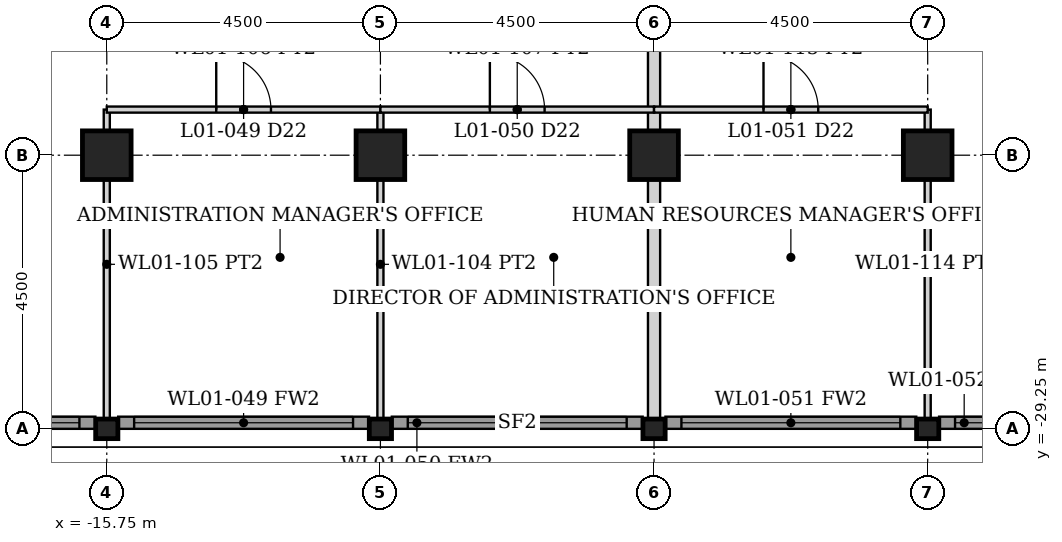
"""IFC4 building model, lengths in metres.
Left out: names, types, materials, properties, quantities, classifications, styles, units other than length and angle.
Written with IfcOpenShell. Run it as: python <this file> out.ifc"""

import sys

from ifc_helpers import new_model, si_unit, direction, frame, frame_2d, origin, origin_2d, place, context, subcontext, project, spatial, rectangle, hollow_rectangle, i_section, extrude, element, fill, save


model = new_model("IFC4")
c1 = context("Model", 3, precision=1e-05, world=origin(), true_north=direction((0.0, 1.0)))
c2 = subcontext(c1, "Body", "Model", "MODEL_VIEW")
j1 = project(units=[si_unit("LENGTHUNIT", "METRE"), si_unit("PLANEANGLEUNIT", "RADIAN")], contexts=[c1])
p1 = place(None, origin())
s1 = spatial("IfcSite", under=j1, at=p1, CompositionType="ELEMENT")
p2 = place(p1, origin())
s2 = spatial("IfcBuilding", under=s1, at=p2, CompositionType="ELEMENT")
p3 = place(p2, frame((0.0, 0.0, 6.0)))
s3 = spatial("IfcBuildingStorey", under=s2, at=p3, CompositionType="ELEMENT", Elevation=6.0)
for number, where, z_axis, x_axis in (
    (1, (-15.75, -24.75, 0.0), (0.0, 0.0, 1.0), (0.0, 1.0, 0.0)),
    (2, (-11.25, -24.75, 0.0), (0.0, 0.0, 1.0), (0.0, 1.0, 0.0)),
    (3, (-6.75, -24.75, 0.0), (0.0, 0.0, 1.0), (0.0, 1.0, 0.0)),
    (4, (-2.25, -24.75, 0.0), (0.0, 0.0, 1.0), (0.0, 1.0, 0.0)),
):
    element("IfcColumn", number, at=place(p3, frame(where, z_axis=z_axis, x_axis=x_axis)), inside=s3, PredefinedType="COLUMN", context=c2, shape_type="SweptSolid", body=[
        extrude(hollow_rectangle(XDim=0.8, YDim=0.8, WallThickness=0.08, at=origin_2d()), origin(), (0.0, 0.0, 1.0), 5.0),
    ])
for number, where, z_axis, x_axis in (
    (5, (-15.75, -29.25, 0.0), (0.0, 0.0, 1.0), (0.0, 1.0, 0.0)),
    (6, (-11.25, -29.25, 0.0), (0.0, 0.0, 1.0), (0.0, 1.0, 0.0)),
    (7, (-6.75, -29.25, 0.0), (0.0, 0.0, 1.0), (0.0, 1.0, 0.0)),
    (8, (-2.25, -29.25, 0.0), (0.0, 0.0, 1.0), (0.0, 1.0, 0.0)),
):
    element("IfcColumn", number, at=place(p3, frame(where, z_axis=z_axis, x_axis=x_axis)), inside=s3, PredefinedType="COLUMN", context=c2, shape_type="SweptSolid", body=[
        extrude(i_section(OverallWidth=0.322, OverallDepth=0.365, WebThickness=0.027, FlangeThickness=0.044, FilletRadius=0.015, at=origin_2d()), origin(), (0.0, 0.0, 1.0), 5.0),
    ])
p4 = place(p3, frame((-20.062, -29.15, 0.0), z_axis=(0.0, 0.0, 1.0), x_axis=(1.0, 0.0, 0.0)))
e9 = element("IfcWall", 9, at=p4, inside=s3, PredefinedType="SOLIDWALL", context=c2, shape_type="SweptSolid", body=[
    extrude(rectangle(XDim=4.125, YDim=0.2, at=frame_2d((2.062, 0.0))), origin(), (0.0, 0.0, 1.0), 4.133),
])
p5 = place(p4, frame((0.262, 0.0, 0.15)))
e10 = element("IfcOpeningElement", 10, at=p5, cuts=e9, PredefinedType="OPENING", context=c2, shape_type="SweptSolid", body=[
    extrude(rectangle(XDim=3.6, YDim=3.833, at=frame_2d((1.8, 1.917))), frame((0.0, 0.11, 0.0), z_axis=(0.0, -1.0, 0.0), x_axis=(1.0, 0.0, 0.0)), (0.0, 0.0, 1.0), 0.22),
])
p6 = place(p3, frame((-15.562, -29.15, 0.0), z_axis=(0.0, 0.0, 1.0), x_axis=(1.0, 0.0, 0.0)))
e11 = element("IfcWall", 11, at=p6, inside=s3, PredefinedType="SOLIDWALL", context=c2, shape_type="SweptSolid", body=[
    extrude(rectangle(XDim=4.125, YDim=0.2, at=frame_2d((2.062, 0.0))), origin(), (0.0, 0.0, 1.0), 4.133),
])
p7 = place(p6, frame((0.262, 0.0, 0.15)))
e12 = element("IfcOpeningElement", 12, at=p7, cuts=e11, PredefinedType="OPENING", context=c2, shape_type="SweptSolid", body=[
    extrude(rectangle(XDim=3.6, YDim=3.833, at=frame_2d((1.8, 1.917))), frame((0.0, 0.11, 0.0), z_axis=(0.0, -1.0, 0.0), x_axis=(1.0, 0.0, 0.0)), (0.0, 0.0, 1.0), 0.22),
])
p8 = place(p3, frame((-11.062, -29.15, 0.0), z_axis=(0.0, 0.0, 1.0), x_axis=(1.0, 0.0, 0.0)))
e13 = element("IfcWall", 13, at=p8, inside=s3, PredefinedType="SOLIDWALL", context=c2, shape_type="SweptSolid", body=[
    extrude(rectangle(XDim=4.125, YDim=0.2, at=frame_2d((2.062, 0.0))), origin(), (0.0, 0.0, 1.0), 4.133),
])
p9 = place(p8, frame((0.262, 0.0, 0.15)))
e14 = element("IfcOpeningElement", 14, at=p9, cuts=e13, PredefinedType="OPENING", context=c2, shape_type="SweptSolid", body=[
    extrude(rectangle(XDim=3.6, YDim=3.833, at=frame_2d((1.8, 1.917))), frame((0.0, 0.11, 0.0), z_axis=(0.0, -1.0, 0.0), x_axis=(1.0, 0.0, 0.0)), (0.0, 0.0, 1.0), 0.22),
])
p10 = place(p3, frame((-6.562, -29.15, 0.0), z_axis=(0.0, 0.0, 1.0), x_axis=(1.0, 0.0, 0.0)))
e15 = element("IfcWall", 15, at=p10, inside=s3, PredefinedType="SOLIDWALL", context=c2, shape_type="SweptSolid", body=[
    extrude(rectangle(XDim=4.125, YDim=0.2, at=frame_2d((2.062, 0.0))), origin(), (0.0, 0.0, 1.0), 4.133),
])
p11 = place(p10, frame((0.262, 0.0, 0.15)))
e16 = element("IfcOpeningElement", 16, at=p11, cuts=e15, PredefinedType="OPENING", context=c2, shape_type="SweptSolid", body=[
    extrude(rectangle(XDim=3.6, YDim=3.833, at=frame_2d((1.8, 1.917))), frame((0.0, 0.11, 0.0), z_axis=(0.0, -1.0, 0.0), x_axis=(1.0, 0.0, 0.0)), (0.0, 0.0, 1.0), 0.22),
])
p12 = place(p3, frame((-2.062, -29.15, 0.0), z_axis=(0.0, 0.0, 1.0), x_axis=(1.0, 0.0, 0.0)))
e17 = element("IfcWall", 17, at=p12, inside=s3, PredefinedType="SOLIDWALL", context=c2, shape_type="SweptSolid", body=[
    extrude(rectangle(XDim=4.125, YDim=0.2, at=frame_2d((2.062, 0.0))), origin(), (0.0, 0.0, 1.0), 4.133),
])
p13 = place(p12, frame((0.262, 0.0, 0.15)))
e18 = element("IfcOpeningElement", 18, at=p13, cuts=e17, PredefinedType="OPENING", context=c2, shape_type="SweptSolid", body=[
    extrude(rectangle(XDim=3.6, YDim=3.833, at=frame_2d((1.8, 1.917))), frame((0.0, 0.11, 0.0), z_axis=(0.0, -1.0, 0.0), x_axis=(1.0, 0.0, 0.0)), (0.0, 0.0, 1.0), 0.22),
])
p14 = place(p3, frame((-6.75, -29.089, 0.0), z_axis=(0.0, 0.0, 1.0), x_axis=(0.0, 1.0, 0.0)))
e19 = element("IfcWall", 19, at=p14, inside=s3, PredefinedType="PARTITIONING", context=c2, shape_type="SweptSolid", body=[
    extrude(rectangle(XDim=19.889, YDim=0.2, at=frame_2d((9.944, 0.0))), origin(), (0.0, 0.0, 1.0), 3.829),
])
for number, where, z_axis, x_axis in (
    (20, (-15.75, -29.089, 0.0), (0.0, 0.0, 1.0), (0.0, 1.0, 0.0)),
    (21, (-11.25, -29.089, 0.0), (0.0, 0.0, 1.0), (0.0, 1.0, 0.0)),
):
    element("IfcWall", number, at=place(p3, frame(where, z_axis=z_axis, x_axis=x_axis)), inside=s3, PredefinedType="PARTITIONING", context=c2, shape_type="SweptSolid", body=[
        extrude(rectangle(XDim=5.089, YDim=0.1, at=frame_2d((2.544, 0.0))), origin(), (0.0, 0.0, 1.0), 3.829),
    ])
p15 = place(p3, frame((-15.75, -24.0, 0.0), z_axis=(0.0, 0.0, 1.0), x_axis=(1.0, 0.0, 0.0)))
e22 = element("IfcWall", 22, at=p15, inside=s3, PredefinedType="PARTITIONING", context=c2, shape_type="SweptSolid", body=[
    extrude(rectangle(XDim=4.5, YDim=0.1, at=frame_2d((2.25, 0.0))), origin(), (0.0, 0.0, 1.0), 3.829),
])
p16 = place(p15, frame((1.8, 0.0, 0.0)))
e23 = element("IfcOpeningElement", 23, at=p16, cuts=e22, PredefinedType="OPENING", context=c2, shape_type="SweptSolid", body=[
    extrude(rectangle(XDim=0.9, YDim=2.1, at=frame_2d((0.45, 1.05))), frame((0.0, 0.06, 0.0), z_axis=(0.0, -1.0, 0.0), x_axis=(1.0, 0.0, 0.0)), (0.0, 0.0, 1.0), 0.12),
])
p17 = place(p3, frame((-11.25, -24.0, 0.0), z_axis=(0.0, 0.0, 1.0), x_axis=(1.0, 0.0, 0.0)))
e24 = element("IfcWall", 24, at=p17, inside=s3, PredefinedType="PARTITIONING", context=c2, shape_type="SweptSolid", body=[
    extrude(rectangle(XDim=4.5, YDim=0.1, at=frame_2d((2.25, 0.0))), origin(), (0.0, 0.0, 1.0), 3.829),
])
p18 = place(p17, frame((1.8, 0.0, 0.0)))
e25 = element("IfcOpeningElement", 25, at=p18, cuts=e24, PredefinedType="OPENING", context=c2, shape_type="SweptSolid", body=[
    extrude(rectangle(XDim=0.9, YDim=2.1, at=frame_2d((0.45, 1.05))), frame((0.0, 0.06, 0.0), z_axis=(0.0, -1.0, 0.0), x_axis=(1.0, 0.0, 0.0)), (0.0, 0.0, 1.0), 0.12),
])
p19 = place(p3, frame((-2.25, -29.089, 0.0), z_axis=(0.0, 0.0, 1.0), x_axis=(0.0, 1.0, 0.0)))
e26 = element("IfcWall", 26, at=p19, inside=s3, PredefinedType="PARTITIONING", context=c2, shape_type="SweptSolid", body=[
    extrude(rectangle(XDim=5.089, YDim=0.1, at=frame_2d((2.544, 0.0))), origin(), (0.0, 0.0, 1.0), 3.829),
])
p20 = place(p3, frame((-6.75, -24.0, 0.0), z_axis=(0.0, 0.0, 1.0), x_axis=(1.0, 0.0, 0.0)))
e27 = element("IfcWall", 27, at=p20, inside=s3, PredefinedType="PARTITIONING", context=c2, shape_type="SweptSolid", body=[
    extrude(rectangle(XDim=4.5, YDim=0.1, at=frame_2d((2.25, 0.0))), origin(), (0.0, 0.0, 1.0), 3.829),
])
p21 = place(p20, frame((1.8, 0.0, 0.0)))
e28 = element("IfcOpeningElement", 28, at=p21, cuts=e27, PredefinedType="OPENING", context=c2, shape_type="SweptSolid", body=[
    extrude(rectangle(XDim=0.9, YDim=2.1, at=frame_2d((0.45, 1.05))), frame((0.0, 0.06, 0.0), z_axis=(0.0, -1.0, 0.0), x_axis=(1.0, 0.0, 0.0)), (0.0, 0.0, 1.0), 0.12),
])
p22 = place(p5, origin())
e29 = element("IfcWindow", 29, at=p22, inside=s3, PartitioningType="SINGLE_PANEL", PredefinedType="WINDOW", context=c2, shape_type="SweptSolid", body=[
    extrude(rectangle(XDim=3.6, YDim=3.833, at=frame_2d((1.8, 1.917))), frame((0.0, 0.03, 0.0), z_axis=(0.0, -1.0, 0.0), x_axis=(1.0, 0.0, 0.0)), (0.0, 0.0, 1.0), 0.06),
])
fill(e10, e29)
p23 = place(p7, origin())
e30 = element("IfcWindow", 30, at=p23, inside=s3, PartitioningType="SINGLE_PANEL", PredefinedType="WINDOW", context=c2, shape_type="SweptSolid", body=[
    extrude(rectangle(XDim=3.6, YDim=3.833, at=frame_2d((1.8, 1.917))), frame((0.0, 0.03, 0.0), z_axis=(0.0, -1.0, 0.0), x_axis=(1.0, 0.0, 0.0)), (0.0, 0.0, 1.0), 0.06),
])
fill(e12, e30)
p24 = place(p9, origin())
e31 = element("IfcWindow", 31, at=p24, inside=s3, PartitioningType="SINGLE_PANEL", PredefinedType="WINDOW", context=c2, shape_type="SweptSolid", body=[
    extrude(rectangle(XDim=3.6, YDim=3.833, at=frame_2d((1.8, 1.917))), frame((0.0, 0.03, 0.0), z_axis=(0.0, -1.0, 0.0), x_axis=(1.0, 0.0, 0.0)), (0.0, 0.0, 1.0), 0.06),
])
fill(e14, e31)
p25 = place(p11, origin())
e32 = element("IfcWindow", 32, at=p25, inside=s3, PartitioningType="SINGLE_PANEL", PredefinedType="WINDOW", context=c2, shape_type="SweptSolid", body=[
    extrude(rectangle(XDim=3.6, YDim=3.833, at=frame_2d((1.8, 1.917))), frame((0.0, 0.03, 0.0), z_axis=(0.0, -1.0, 0.0), x_axis=(1.0, 0.0, 0.0)), (0.0, 0.0, 1.0), 0.06),
])
fill(e16, e32)
p26 = place(p13, origin())
e33 = element("IfcWindow", 33, at=p26, inside=s3, PartitioningType="SINGLE_PANEL", PredefinedType="WINDOW", context=c2, shape_type="SweptSolid", body=[
    extrude(rectangle(XDim=3.6, YDim=3.833, at=frame_2d((1.8, 1.917))), frame((0.0, 0.03, 0.0), z_axis=(0.0, -1.0, 0.0), x_axis=(1.0, 0.0, 0.0)), (0.0, 0.0, 1.0), 0.06),
])
fill(e18, e33)
p27 = place(p16, origin())
e34 = element("IfcDoor", 34, at=p27, inside=s3, OperationType="SINGLE_SWING_LEFT", PredefinedType="DOOR", context=c2, shape_type="SweptSolid", body=[
    extrude(rectangle(XDim=0.9, YDim=2.1, at=frame_2d((0.45, 1.05))), frame((0.0, 0.025, 0.0), z_axis=(0.0, -1.0, 0.0), x_axis=(1.0, 0.0, 0.0)), (0.0, 0.0, 1.0), 0.05),
])
fill(e23, e34)
p28 = place(p18, origin())
e35 = element("IfcDoor", 35, at=p28, inside=s3, OperationType="SINGLE_SWING_LEFT", PredefinedType="DOOR", context=c2, shape_type="SweptSolid", body=[
    extrude(rectangle(XDim=0.9, YDim=2.1, at=frame_2d((0.45, 1.05))), frame((0.0, 0.025, 0.0), z_axis=(0.0, -1.0, 0.0), x_axis=(1.0, 0.0, 0.0)), (0.0, 0.0, 1.0), 0.05),
])
fill(e25, e35)
p29 = place(p21, origin())
e36 = element("IfcDoor", 36, at=p29, inside=s3, OperationType="SINGLE_SWING_LEFT", PredefinedType="DOOR", context=c2, shape_type="SweptSolid", body=[
    extrude(rectangle(XDim=0.9, YDim=2.1, at=frame_2d((0.45, 1.05))), frame((0.0, 0.025, 0.0), z_axis=(0.0, -1.0, 0.0), x_axis=(1.0, 0.0, 0.0)), (0.0, 0.0, 1.0), 0.05),
])
fill(e28, e36)
save(model, sys.argv[1])
